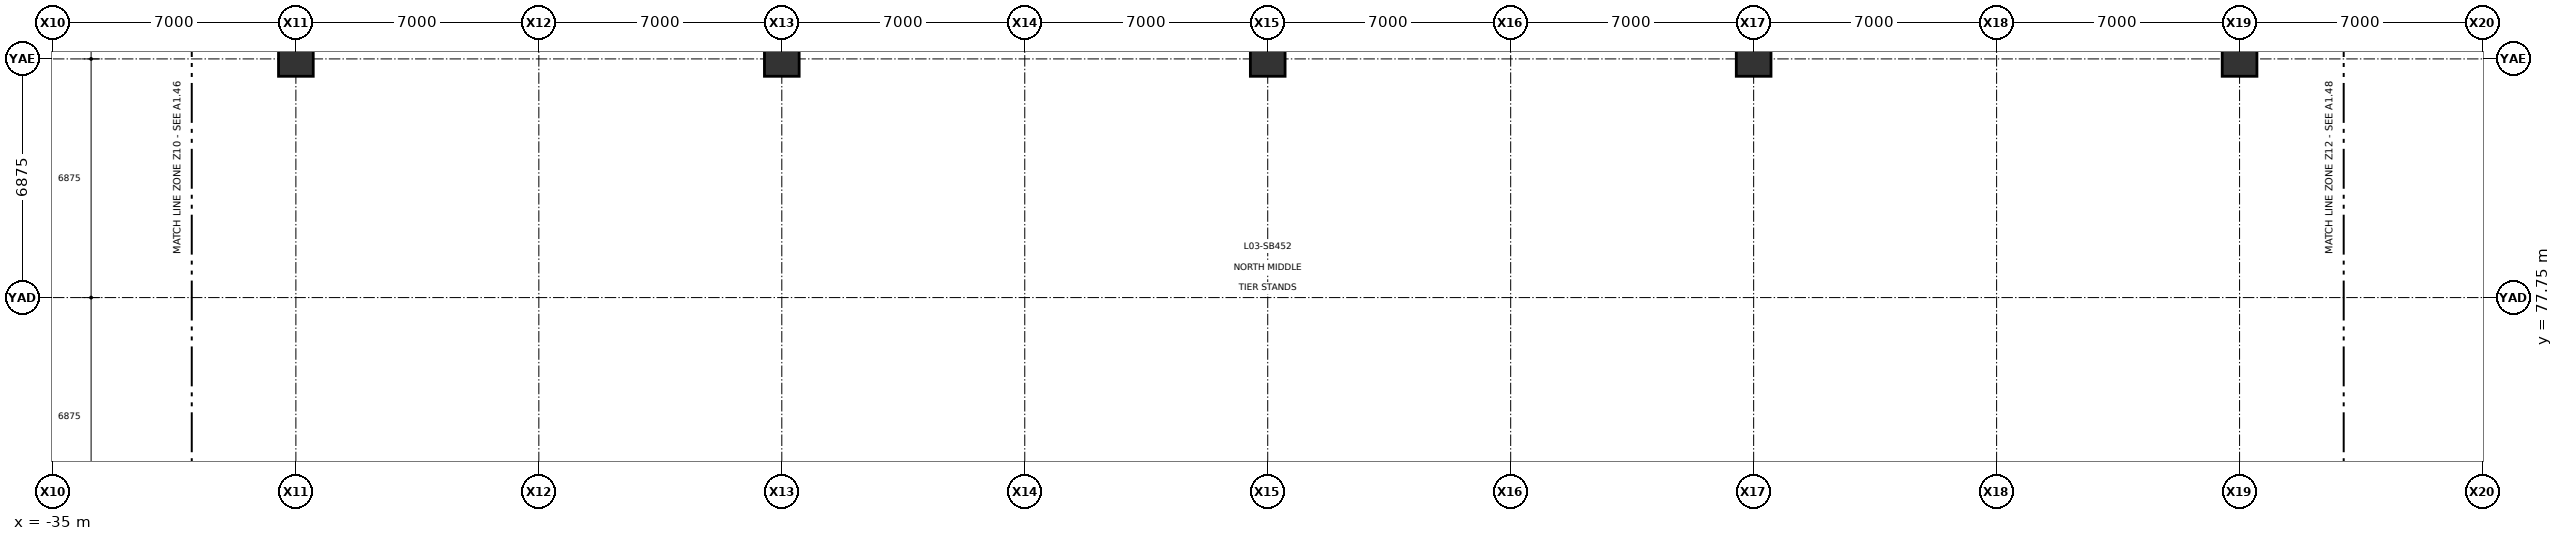
"""IFC4 building model, lengths in metres.
Left out: names, types, materials, properties, quantities, classifications, styles, units other than length and angle.
Written with IfcOpenShell. Run it as: python <this file> out.ifc"""

import sys

from ifc_helpers import new_model, si_unit, direction, frame, origin, origin_2d, place, context, subcontext, project, spatial, rectangle, extrude, element, save


model = new_model("IFC4")
c1 = context("Model", 3, precision=1e-05, world=origin(), true_north=direction((0.0, 1.0)))
c2 = subcontext(c1, "Body", "Model", "MODEL_VIEW")
j1 = project(units=[si_unit("LENGTHUNIT", "METRE"), si_unit("PLANEANGLEUNIT", "RADIAN")], contexts=[c1])
p1 = place(None, origin())
s1 = spatial("IfcSite", under=j1, at=p1, CompositionType="ELEMENT")
p2 = place(p1, origin())
s2 = spatial("IfcBuilding", under=s1, at=p2, CompositionType="ELEMENT")
p3 = place(p2, frame((0.0, 0.0, 11.4)))
s3 = spatial("IfcBuildingStorey", under=s2, at=p3, CompositionType="ELEMENT", Elevation=11.4)
for number, where, z_axis, x_axis in (
    (1, (-28.0, 84.625, 0.0), (0.0, 0.0, 1.0), (1.0, 0.0, 0.0)),
    (2, (-14.0, 84.625, 0.0), (0.0, 0.0, 1.0), (1.0, 0.0, 0.0)),
    (3, (0.0, 84.625, 0.0), (0.0, 0.0, 1.0), (1.0, 0.0, 0.0)),
    (4, (14.0, 84.625, 0.0), (0.0, 0.0, 1.0), (1.0, 0.0, 0.0)),
    (5, (28.0, 84.625, 0.0), (0.0, 0.0, 1.0), (1.0, 0.0, 0.0)),
):
    element("IfcColumn", number, at=place(p3, frame(where, z_axis=z_axis, x_axis=x_axis)), inside=s3, PredefinedType="COLUMN", context=c2, shape_type="SweptSolid", body=[
        extrude(rectangle(XDim=1.0, YDim=1.0, at=origin_2d()), origin(), (0.0, 0.0, 1.0), 4.798),
    ])
save(model, sys.argv[1])
